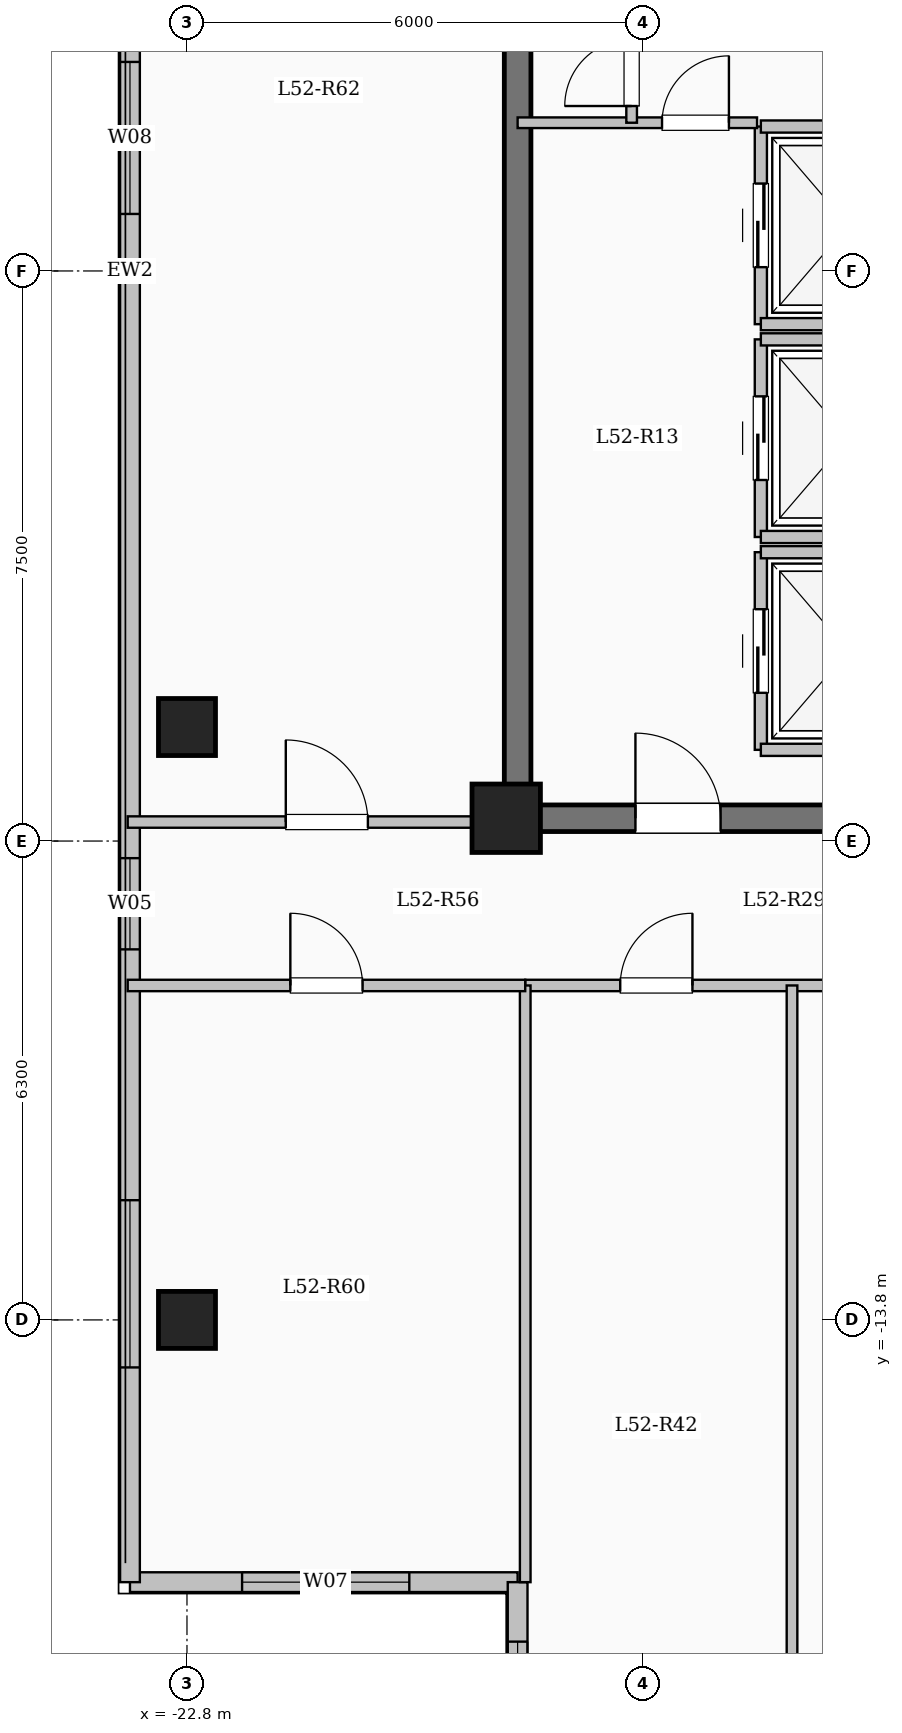
"""IFC4 building model, lengths in metres.
Left out: names, types, materials, properties, quantities, classifications, styles, units other than length and angle.
Written with IfcOpenShell. Run it as: python <this file> out.ifc"""

import sys

from ifc_helpers import new_model, si_unit, direction, frame, frame_2d, origin, origin_2d, place, context, subcontext, project, spatial, rectangle, extrude, element, fill, save


model = new_model("IFC4")
c1 = context("Model", 3, precision=1e-05, world=origin(), true_north=direction((0.0, 1.0)))
c2 = subcontext(c1, "Body", "Model", "MODEL_VIEW")
j1 = project(units=[si_unit("LENGTHUNIT", "METRE"), si_unit("PLANEANGLEUNIT", "RADIAN")], contexts=[c1])
p1 = place(None, origin())
s1 = spatial("IfcSite", under=j1, at=p1, CompositionType="ELEMENT")
p2 = place(p1, origin())
s2 = spatial("IfcBuilding", under=s1, at=p2, CompositionType="ELEMENT")
p3 = place(p2, frame((0.0, 0.0, 193.6)))
s3 = spatial("IfcBuildingStorey", under=s2, at=p3, CompositionType="ELEMENT", Elevation=193.6)
p4 = place(p3, frame((-18.6, -7.2, 0.0), z_axis=(0.0, 0.0, 1.0), x_axis=(1.0, 0.0, 0.0)))
e1 = element("IfcColumn", 1, at=p4, inside=s3, PredefinedType="COLUMN", context=c2, shape_type="SweptSolid", body=[
    extrude(rectangle(XDim=0.9, YDim=0.9, at=origin_2d()), origin(), (0.0, 0.0, 1.0), 3.35),
])
for number, where, z_axis, x_axis in (
    (2, (-22.8, -13.8, 0.0), (0.0, 0.0, 1.0), (1.0, 0.0, 0.0)),
    (3, (-22.8, -6.0, 0.0), (0.0, 0.0, 1.0), (1.0, 0.0, 0.0)),
):
    element("IfcColumn", number, at=place(p3, frame(where, z_axis=z_axis, x_axis=x_axis)), inside=s3, PredefinedType="COLUMN", context=c2, shape_type="SweptSolid", body=[
        extrude(rectangle(XDim=0.75, YDim=0.75, at=origin_2d()), origin(), (0.0, 0.0, 1.0), 3.35),
    ])
p5 = place(p3, frame((-18.45, -17.25, 0.0), z_axis=(0.0, 0.0, 1.0), x_axis=(-1.0, 0.0, 0.0)))
e4 = element("IfcWall", 4, at=p5, inside=s3, PredefinedType="SOLIDWALL", context=c2, shape_type="SweptSolid", body=[
    extrude(rectangle(XDim=5.1, YDim=0.26, at=frame_2d((2.55, 0.0))), origin(), (0.0, 0.0, 1.0), 3.1),
])
p6 = place(p5, frame((1.425, 0.0, 0.9)))
e5 = element("IfcOpeningElement", 5, at=p6, cuts=e4, PredefinedType="OPENING", context=c2, shape_type="SweptSolid", body=[
    extrude(rectangle(XDim=2.2, YDim=1.75, at=frame_2d((1.1, 0.875))), frame((0.0, 0.14, 0.0), z_axis=(0.0, -1.0, 0.0), x_axis=(1.0, 0.0, 0.0)), (0.0, 0.0, 1.0), 0.28),
])
p7 = place(p3, frame((-23.55, -17.25, 0.0), z_axis=(0.0, 0.0, 1.0), x_axis=(0.0, 1.0, 0.0)))
e6 = element("IfcWall", 6, at=p7, inside=s3, PredefinedType="SOLIDWALL", context=c2, shape_type="SweptSolid", body=[
    extrude(rectangle(XDim=34.5, YDim=0.26, at=frame_2d((17.25, 0.0))), origin(), (0.0, 0.0, 1.0), 3.1),
])
p8 = place(p7, frame((2.825, 0.0, 0.9)))
e7 = element("IfcOpeningElement", 7, at=p8, cuts=e6, PredefinedType="OPENING", context=c2, shape_type="SweptSolid", body=[
    extrude(rectangle(XDim=2.2, YDim=1.75, at=frame_2d((1.1, 0.875))), frame((0.0, 0.14, 0.0), z_axis=(0.0, -1.0, 0.0), x_axis=(1.0, 0.0, 0.0)), (0.0, 0.0, 1.0), 0.28),
])
p9 = place(p7, frame((8.325, 0.0, 0.95)))
e8 = element("IfcOpeningElement", 8, at=p9, cuts=e6, PredefinedType="OPENING", context=c2, shape_type="SweptSolid", body=[
    extrude(rectangle(XDim=1.2, YDim=1.5, at=frame_2d((0.6, 0.75))), frame((0.0, 0.14, 0.0), z_axis=(0.0, -1.0, 0.0), x_axis=(1.0, 0.0, 0.0)), (0.0, 0.0, 1.0), 0.28),
])
p10 = place(p7, frame((18.0, 0.0, 0.9)))
e9 = element("IfcOpeningElement", 9, at=p10, cuts=e6, PredefinedType="OPENING", context=c2, shape_type="SweptSolid", body=[
    extrude(rectangle(XDim=2.0, YDim=1.7, at=frame_2d((1.0, 0.85))), frame((0.0, 0.14, 0.0), z_axis=(0.0, -1.0, 0.0), x_axis=(1.0, 0.0, 0.0)), (0.0, 0.0, 1.0), 0.28),
])
p11 = place(p7, frame((28.375, 0.0, 0.95)))
e10 = element("IfcOpeningElement", 10, at=p11, cuts=e6, PredefinedType="OPENING", context=c2, shape_type="SweptSolid", body=[
    extrude(rectangle(XDim=1.0, YDim=1.5, at=frame_2d((0.5, 0.75))), frame((0.0, 0.14, 0.0), z_axis=(0.0, -1.0, 0.0), x_axis=(1.0, 0.0, 0.0)), (0.0, 0.0, 1.0), 0.28),
])
p12 = place(p7, frame((31.125, 0.0, 0.9)))
e11 = element("IfcOpeningElement", 11, at=p12, cuts=e6, PredefinedType="OPENING", context=c2, shape_type="SweptSolid", body=[
    extrude(rectangle(XDim=2.0, YDim=1.7, at=frame_2d((1.0, 0.85))), frame((0.0, 0.14, 0.0), z_axis=(0.0, -1.0, 0.0), x_axis=(1.0, 0.0, 0.0)), (0.0, 0.0, 1.0), 0.28),
])
p13 = place(p3, frame((-18.45, -20.85, 0.0), z_axis=(0.0, 0.0, 1.0), x_axis=(0.0, 1.0, 0.0)))
e12 = element("IfcWall", 12, at=p13, inside=s3, PredefinedType="SOLIDWALL", context=c2, shape_type="SweptSolid", body=[
    extrude(rectangle(XDim=3.6, YDim=0.26, at=frame_2d((1.8, 0.0))), origin(), (0.0, 0.0, 1.0), 3.1),
])
p14 = place(p13, frame((0.817, 0.0, 0.9)))
e13 = element("IfcOpeningElement", 13, at=p14, cuts=e12, PredefinedType="OPENING", context=c2, shape_type="SweptSolid", body=[
    extrude(rectangle(XDim=2.0, YDim=1.7, at=frame_2d((1.0, 0.85))), frame((0.0, 0.14, 0.0), z_axis=(0.0, -1.0, 0.0), x_axis=(1.0, 0.0, 0.0)), (0.0, 0.0, 1.0), 0.28),
])
p15 = place(p3, frame((-15.25, -6.3, 0.0), z_axis=(0.0, 0.0, 1.0), x_axis=(0.0, 1.0, 0.0)))
e14 = element("IfcWall", 14, at=p15, inside=s3, PredefinedType="SOLIDWALL", context=c2, shape_type="SweptSolid", body=[
    extrude(rectangle(XDim=2.6, YDim=0.16, at=frame_2d((1.3, 0.0))), origin(), (0.0, 0.0, 1.0), 3.1),
])
p16 = place(p15, frame((0.75, 0.0, 0.0)))
e15 = element("IfcOpeningElement", 15, at=p16, cuts=e14, PredefinedType="OPENING", context=c2, shape_type="SweptSolid", body=[
    extrude(rectangle(XDim=1.1, YDim=2.15, at=frame_2d((0.55, 1.075))), frame((0.0, 0.09, 0.0), z_axis=(0.0, -1.0, 0.0), x_axis=(1.0, 0.0, 0.0)), (0.0, 0.0, 1.0), 0.18),
])
for number, where, z_axis, x_axis in (
    (16, (-15.25, -6.3, 0.0), (0.0, 0.0, 1.0), (1.0, 0.0, 0.0)),
    (17, (-15.25, -3.7, 0.0), (0.0, 0.0, 1.0), (1.0, 0.0, 0.0)),
):
    element("IfcWall", number, at=place(p3, frame(where, z_axis=z_axis, x_axis=x_axis)), inside=s3, PredefinedType="SOLIDWALL", context=c2, shape_type="SweptSolid", body=[
        extrude(rectangle(XDim=2.3, YDim=0.16, at=frame_2d((1.15, 0.0))), origin(), (0.0, 0.0, 1.0), 3.1),
    ])
p17 = place(p3, frame((-15.25, -3.5, 0.0), z_axis=(0.0, 0.0, 1.0), x_axis=(0.0, 1.0, 0.0)))
e18 = element("IfcWall", 18, at=p17, inside=s3, PredefinedType="SOLIDWALL", context=c2, shape_type="SweptSolid", body=[
    extrude(rectangle(XDim=2.6, YDim=0.16, at=frame_2d((1.3, 0.0))), origin(), (0.0, 0.0, 1.0), 3.1),
])
p18 = place(p17, frame((0.75, 0.0, 0.0)))
e19 = element("IfcOpeningElement", 19, at=p18, cuts=e18, PredefinedType="OPENING", context=c2, shape_type="SweptSolid", body=[
    extrude(rectangle(XDim=1.1, YDim=2.15, at=frame_2d((0.55, 1.075))), frame((0.0, 0.09, 0.0), z_axis=(0.0, -1.0, 0.0), x_axis=(1.0, 0.0, 0.0)), (0.0, 0.0, 1.0), 0.18),
])
for number, where, z_axis, x_axis in (
    (20, (-15.25, -3.5, 0.0), (0.0, 0.0, 1.0), (1.0, 0.0, 0.0)),
    (21, (-15.25, -0.9, 0.0), (0.0, 0.0, 1.0), (1.0, 0.0, 0.0)),
):
    element("IfcWall", number, at=place(p3, frame(where, z_axis=z_axis, x_axis=x_axis)), inside=s3, PredefinedType="SOLIDWALL", context=c2, shape_type="SweptSolid", body=[
        extrude(rectangle(XDim=2.3, YDim=0.16, at=frame_2d((1.15, 0.0))), origin(), (0.0, 0.0, 1.0), 3.1),
    ])
p19 = place(p3, frame((-15.25, -0.7, 0.0), z_axis=(0.0, 0.0, 1.0), x_axis=(0.0, 1.0, 0.0)))
e22 = element("IfcWall", 22, at=p19, inside=s3, PredefinedType="SOLIDWALL", context=c2, shape_type="SweptSolid", body=[
    extrude(rectangle(XDim=2.6, YDim=0.16, at=frame_2d((1.3, 0.0))), origin(), (0.0, 0.0, 1.0), 3.1),
])
p20 = place(p19, frame((0.75, 0.0, 0.0)))
e23 = element("IfcOpeningElement", 23, at=p20, cuts=e22, PredefinedType="OPENING", context=c2, shape_type="SweptSolid", body=[
    extrude(rectangle(XDim=1.1, YDim=2.15, at=frame_2d((0.55, 1.075))), frame((0.0, 0.09, 0.0), z_axis=(0.0, -1.0, 0.0), x_axis=(1.0, 0.0, 0.0)), (0.0, 0.0, 1.0), 0.18),
])
for number, where, z_axis, x_axis in (
    (24, (-15.25, -0.7, 0.0), (0.0, 0.0, 1.0), (1.0, 0.0, 0.0)),
    (25, (-15.25, 1.9, 0.0), (0.0, 0.0, 1.0), (1.0, 0.0, 0.0)),
):
    element("IfcWall", number, at=place(p3, frame(where, z_axis=z_axis, x_axis=x_axis)), inside=s3, PredefinedType="SOLIDWALL", context=c2, shape_type="SweptSolid", body=[
        extrude(rectangle(XDim=2.3, YDim=0.16, at=frame_2d((1.15, 0.0))), origin(), (0.0, 0.0, 1.0), 3.1),
    ])
p21 = place(p3, frame((-18.45, -7.375, 0.0), z_axis=(0.0, 0.0, 1.0), x_axis=(0.0, 1.0, 0.0)))
e26 = element("IfcWall", 26, at=p21, inside=s3, PredefinedType="SHEAR", context=c2, shape_type="SweptSolid", body=[
    extrude(rectangle(XDim=14.05, YDim=0.35, at=frame_2d((7.025, 0.0))), origin(), (0.0, 0.0, 1.0), 3.35),
])
p22 = place(p3, frame((-18.625, -7.2, 0.0), z_axis=(0.0, 0.0, 1.0), x_axis=(1.0, 0.0, 0.0)))
e27 = element("IfcWall", 27, at=p22, inside=s3, PredefinedType="SHEAR", context=c2, shape_type="SweptSolid", body=[
    extrude(rectangle(XDim=8.55, YDim=0.35, at=frame_2d((4.275, 0.0))), origin(), (0.0, 0.0, 1.0), 3.35),
])
p23 = place(p22, frame((1.725, 0.0, 0.0)))
e28 = element("IfcOpeningElement", 28, at=p23, cuts=e27, PredefinedType="OPENING", context=c2, shape_type="SweptSolid", body=[
    extrude(rectangle(XDim=1.12, YDim=2.15, at=frame_2d((0.56, 1.075))), frame((0.0, 0.185, 0.0), z_axis=(0.0, -1.0, 0.0), x_axis=(1.0, 0.0, 0.0)), (0.0, 0.0, 1.0), 0.37),
])
p24 = place(p3, frame((-18.45, 1.95, 0.0), z_axis=(0.0, 0.0, 1.0), x_axis=(1.0, 0.0, 0.0)))
e29 = element("IfcWall", 29, at=p24, inside=s3, PredefinedType="PARTITIONING", context=c2, shape_type="SweptSolid", body=[
    extrude(rectangle(XDim=3.15, YDim=0.14, at=frame_2d((1.575, 0.0))), origin(), (0.0, 0.0, 1.0), 3.1),
])
p25 = place(p24, frame((1.9, 0.0, 0.0)))
e30 = element("IfcOpeningElement", 30, at=p25, cuts=e29, PredefinedType="OPENING", context=c2, shape_type="SweptSolid", body=[
    extrude(rectangle(XDim=0.88, YDim=2.1, at=frame_2d((0.44, 1.05))), frame((0.0, 0.08, 0.0), z_axis=(0.0, -1.0, 0.0), x_axis=(1.0, 0.0, 0.0)), (0.0, 0.0, 1.0), 0.16),
])
p26 = place(p3, frame((-16.95, 1.95, 0.0), z_axis=(0.0, 0.0, 1.0), x_axis=(0.0, 1.0, 0.0)))
e31 = element("IfcWall", 31, at=p26, inside=s3, PredefinedType="PARTITIONING", context=c2, shape_type="SweptSolid", body=[
    extrude(rectangle(XDim=1.3, YDim=0.14, at=frame_2d((0.65, 0.0))), origin(), (0.0, 0.0, 1.0), 3.1),
])
p27 = place(p26, frame((0.22, 0.0, 0.0)))
e32 = element("IfcOpeningElement", 32, at=p27, cuts=e31, PredefinedType="OPENING", context=c2, shape_type="SweptSolid", body=[
    extrude(rectangle(XDim=0.88, YDim=2.1, at=frame_2d((0.44, 1.05))), frame((0.0, 0.08, 0.0), z_axis=(0.0, -1.0, 0.0), x_axis=(1.0, 0.0, 0.0)), (0.0, 0.0, 1.0), 0.16),
])
p28 = place(p3, frame((-18.35, -9.4, 0.0), z_axis=(0.0, 0.0, 1.0), x_axis=(1.0, 0.0, 0.0)))
e33 = element("IfcWall", 33, at=p28, inside=s3, PredefinedType="PARTITIONING", context=c2, shape_type="SweptSolid", body=[
    extrude(rectangle(XDim=9.8, YDim=0.15, at=frame_2d((4.9, 0.0))), origin(), (0.0, 0.0, 1.0), 3.1),
])
p29 = place(p28, frame((1.25, 0.0, 0.0)))
e34 = element("IfcOpeningElement", 34, at=p29, cuts=e33, PredefinedType="OPENING", context=c2, shape_type="SweptSolid", body=[
    extrude(rectangle(XDim=0.95, YDim=2.15, at=frame_2d((0.475, 1.075))), frame((0.0, 0.085, 0.0), z_axis=(0.0, -1.0, 0.0), x_axis=(1.0, 0.0, 0.0)), (0.0, 0.0, 1.0), 0.17),
])
p30 = place(p28, frame((4.79, 0.0, 0.0)))
e35 = element("IfcOpeningElement", 35, at=p30, cuts=e33, PredefinedType="OPENING", context=c2, shape_type="SweptSolid", body=[
    extrude(rectangle(XDim=0.95, YDim=2.15, at=frame_2d((0.475, 1.075))), frame((0.0, 0.085, 0.0), z_axis=(0.0, -1.0, 0.0), x_axis=(1.0, 0.0, 0.0)), (0.0, 0.0, 1.0), 0.17),
])
p31 = place(p28, frame((7.94, 0.0, 0.0)))
e36 = element("IfcOpeningElement", 36, at=p31, cuts=e33, PredefinedType="OPENING", context=c2, shape_type="SweptSolid", body=[
    extrude(rectangle(XDim=0.95, YDim=2.15, at=frame_2d((0.475, 1.075))), frame((0.0, 0.085, 0.0), z_axis=(0.0, -1.0, 0.0), x_axis=(1.0, 0.0, 0.0)), (0.0, 0.0, 1.0), 0.17),
])
p32 = place(p3, frame((-14.84, -20.85, 0.0), z_axis=(0.0, 0.0, 1.0), x_axis=(0.0, 1.0, 0.0)))
e37 = element("IfcWall", 37, at=p32, inside=s3, PredefinedType="PARTITIONING", context=c2, shape_type="SweptSolid", body=[
    extrude(rectangle(XDim=11.45, YDim=0.14, at=frame_2d((5.725, 0.0))), origin(), (0.0, 0.0, 1.0), 2.585),
])
p33 = place(p3, frame((-23.58, -7.25, 0.0), z_axis=(0.0, 0.0, 1.0), x_axis=(1.0, 0.0, 0.0)))
e38 = element("IfcWall", 38, at=p33, inside=s3, PredefinedType="PARTITIONING", context=c2, shape_type="SweptSolid", body=[
    extrude(rectangle(XDim=5.13, YDim=0.15, at=frame_2d((2.565, 0.0))), origin(), (0.0, 0.0, 1.0), 3.1),
])
p34 = place(p33, frame((2.08, 0.0, 0.0)))
e39 = element("IfcOpeningElement", 39, at=p34, cuts=e38, PredefinedType="OPENING", context=c2, shape_type="SweptSolid", body=[
    extrude(rectangle(XDim=1.08, YDim=2.15, at=frame_2d((0.54, 1.075))), frame((0.0, 0.085, 0.0), z_axis=(0.0, -1.0, 0.0), x_axis=(1.0, 0.0, 0.0)), (0.0, 0.0, 1.0), 0.17),
])
p35 = place(p3, frame((-18.35, -17.25, 0.0), z_axis=(0.0, 0.0, 1.0), x_axis=(0.0, 1.0, 0.0)))
e40 = element("IfcWall", 40, at=p35, inside=s3, PredefinedType="PARTITIONING", context=c2, shape_type="SweptSolid", body=[
    extrude(rectangle(XDim=7.85, YDim=0.14, at=frame_2d((3.925, 0.0))), origin(), (0.0, 0.0, 1.0), 3.1),
])
p36 = place(p3, frame((-23.58, -9.4, 0.0), z_axis=(0.0, 0.0, 1.0), x_axis=(1.0, 0.0, 0.0)))
e41 = element("IfcWall", 41, at=p36, inside=s3, PredefinedType="PARTITIONING", context=c2, shape_type="SweptSolid", body=[
    extrude(rectangle(XDim=5.23, YDim=0.15, at=frame_2d((2.615, 0.0))), origin(), (0.0, 0.0, 1.0), 3.1),
])
p37 = place(p36, frame((2.14, 0.0, 0.0)))
e42 = element("IfcOpeningElement", 42, at=p37, cuts=e41, PredefinedType="OPENING", context=c2, shape_type="SweptSolid", body=[
    extrude(rectangle(XDim=0.95, YDim=2.15, at=frame_2d((0.475, 1.075))), frame((0.0, 0.085, 0.0), z_axis=(0.0, -1.0, 0.0), x_axis=(1.0, 0.0, 0.0)), (0.0, 0.0, 1.0), 0.17),
])
p38 = place(p6, origin())
e43 = element("IfcWindow", 43, at=p38, inside=s3, PartitioningType="SINGLE_PANEL", PredefinedType="WINDOW", context=c2, shape_type="SweptSolid", body=[
    extrude(rectangle(XDim=2.2, YDim=1.75, at=frame_2d((1.1, 0.875))), frame((0.0, 0.03, 0.0), z_axis=(0.0, -1.0, 0.0), x_axis=(1.0, 0.0, 0.0)), (0.0, 0.0, 1.0), 0.06),
])
fill(e5, e43)
p39 = place(p8, origin())
e44 = element("IfcWindow", 44, at=p39, inside=s3, PartitioningType="SINGLE_PANEL", PredefinedType="WINDOW", context=c2, shape_type="SweptSolid", body=[
    extrude(rectangle(XDim=2.2, YDim=1.75, at=frame_2d((1.1, 0.875))), frame((0.0, 0.03, 0.0), z_axis=(0.0, -1.0, 0.0), x_axis=(1.0, 0.0, 0.0)), (0.0, 0.0, 1.0), 0.06),
])
fill(e7, e44)
p40 = place(p9, origin())
e45 = element("IfcWindow", 45, at=p40, inside=s3, PartitioningType="SINGLE_PANEL", PredefinedType="WINDOW", context=c2, shape_type="SweptSolid", body=[
    extrude(rectangle(XDim=1.2, YDim=1.5, at=frame_2d((0.6, 0.75))), frame((0.0, 0.03, 0.0), z_axis=(0.0, -1.0, 0.0), x_axis=(1.0, 0.0, 0.0)), (0.0, 0.0, 1.0), 0.06),
])
fill(e8, e45)
p41 = place(p10, origin())
e46 = element("IfcWindow", 46, at=p41, inside=s3, PartitioningType="SINGLE_PANEL", PredefinedType="WINDOW", context=c2, shape_type="SweptSolid", body=[
    extrude(rectangle(XDim=2.0, YDim=1.7, at=frame_2d((1.0, 0.85))), frame((0.0, 0.03, 0.0), z_axis=(0.0, -1.0, 0.0), x_axis=(1.0, 0.0, 0.0)), (0.0, 0.0, 1.0), 0.06),
])
fill(e9, e46)
p42 = place(p14, origin())
e47 = element("IfcWindow", 47, at=p42, inside=s3, PartitioningType="SINGLE_PANEL", PredefinedType="WINDOW", context=c2, shape_type="SweptSolid", body=[
    extrude(rectangle(XDim=2.0, YDim=1.7, at=frame_2d((1.0, 0.85))), frame((0.0, 0.03, 0.0), z_axis=(0.0, -1.0, 0.0), x_axis=(1.0, 0.0, 0.0)), (0.0, 0.0, 1.0), 0.06),
])
fill(e13, e47)
p43 = place(p16, origin())
e48 = element("IfcDoor", 48, at=p43, inside=s3, OperationType="SLIDING_TO_LEFT", PredefinedType="DOOR", context=c2, shape_type="SweptSolid", body=[
    extrude(rectangle(XDim=1.1, YDim=2.15, at=frame_2d((0.55, 1.075))), frame((0.0, 0.025, 0.0), z_axis=(0.0, -1.0, 0.0), x_axis=(1.0, 0.0, 0.0)), (0.0, 0.0, 1.0), 0.05),
])
fill(e15, e48)
p44 = place(p18, origin())
e49 = element("IfcDoor", 49, at=p44, inside=s3, OperationType="SLIDING_TO_LEFT", PredefinedType="DOOR", context=c2, shape_type="SweptSolid", body=[
    extrude(rectangle(XDim=1.1, YDim=2.15, at=frame_2d((0.55, 1.075))), frame((0.0, 0.025, 0.0), z_axis=(0.0, -1.0, 0.0), x_axis=(1.0, 0.0, 0.0)), (0.0, 0.0, 1.0), 0.05),
])
fill(e19, e49)
p45 = place(p20, origin())
e50 = element("IfcDoor", 50, at=p45, inside=s3, OperationType="SLIDING_TO_LEFT", PredefinedType="DOOR", context=c2, shape_type="SweptSolid", body=[
    extrude(rectangle(XDim=1.1, YDim=2.15, at=frame_2d((0.55, 1.075))), frame((0.0, 0.025, 0.0), z_axis=(0.0, -1.0, 0.0), x_axis=(1.0, 0.0, 0.0)), (0.0, 0.0, 1.0), 0.05),
])
fill(e23, e50)
p46 = place(p23, origin())
e51 = element("IfcDoor", 51, at=p46, inside=s3, OperationType="SINGLE_SWING_LEFT", PredefinedType="DOOR", context=c2, shape_type="SweptSolid", body=[
    extrude(rectangle(XDim=1.12, YDim=2.15, at=frame_2d((0.56, 1.075))), frame((0.0, 0.025, 0.0), z_axis=(0.0, -1.0, 0.0), x_axis=(1.0, 0.0, 0.0)), (0.0, 0.0, 1.0), 0.05),
])
fill(e28, e51)
p47 = place(p25, origin())
e52 = element("IfcDoor", 52, at=p47, inside=s3, OperationType="SINGLE_SWING_RIGHT", PredefinedType="DOOR", context=c2, shape_type="SweptSolid", body=[
    extrude(rectangle(XDim=0.88, YDim=2.1, at=frame_2d((0.44, 1.05))), frame((0.0, 0.025, 0.0), z_axis=(0.0, -1.0, 0.0), x_axis=(1.0, 0.0, 0.0)), (0.0, 0.0, 1.0), 0.05),
])
fill(e30, e52)
p48 = place(p27, origin())
e53 = element("IfcDoor", 53, at=p48, inside=s3, OperationType="SINGLE_SWING_LEFT", PredefinedType="DOOR", context=c2, shape_type="SweptSolid", body=[
    extrude(rectangle(XDim=0.88, YDim=2.1, at=frame_2d((0.44, 1.05))), frame((0.0, 0.025, 0.0), z_axis=(0.0, -1.0, 0.0), x_axis=(1.0, 0.0, 0.0)), (0.0, 0.0, 1.0), 0.05),
])
fill(e32, e53)
p49 = place(p29, origin())
e54 = element("IfcDoor", 54, at=p49, inside=s3, OperationType="SINGLE_SWING_RIGHT", PredefinedType="DOOR", context=c2, shape_type="SweptSolid", body=[
    extrude(rectangle(XDim=0.95, YDim=2.15, at=frame_2d((0.475, 1.075))), frame((0.0, 0.025, 0.0), z_axis=(0.0, -1.0, 0.0), x_axis=(1.0, 0.0, 0.0)), (0.0, 0.0, 1.0), 0.05),
])
fill(e34, e54)
p50 = place(p37, origin())
e55 = element("IfcDoor", 55, at=p50, inside=s3, OperationType="SINGLE_SWING_LEFT", PredefinedType="DOOR", context=c2, shape_type="SweptSolid", body=[
    extrude(rectangle(XDim=0.95, YDim=2.15, at=frame_2d((0.475, 1.075))), frame((0.0, 0.025, 0.0), z_axis=(0.0, -1.0, 0.0), x_axis=(1.0, 0.0, 0.0)), (0.0, 0.0, 1.0), 0.05),
])
fill(e42, e55)
p51 = place(p34, origin())
e56 = element("IfcDoor", 56, at=p51, inside=s3, OperationType="SINGLE_SWING_LEFT", PredefinedType="DOOR", context=c2, shape_type="SweptSolid", body=[
    extrude(rectangle(XDim=1.08, YDim=2.15, at=frame_2d((0.54, 1.075))), frame((0.0, 0.025, 0.0), z_axis=(0.0, -1.0, 0.0), x_axis=(1.0, 0.0, 0.0)), (0.0, 0.0, 1.0), 0.05),
])
fill(e39, e56)
save(model, sys.argv[1])
